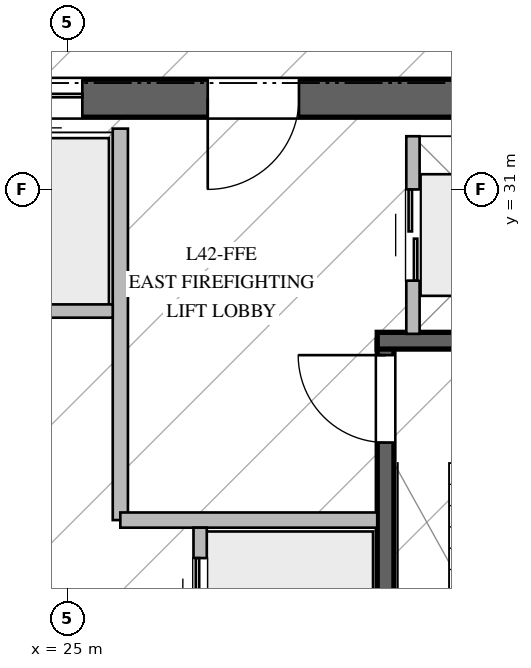
"""IFC4 building model, lengths in metres.
Left out: names, types, materials, properties, quantities, classifications, styles, units other than length and angle.
Written with IfcOpenShell. Run it as: python <this file> out.ifc"""

import sys

from ifc_helpers import new_model, si_unit, direction, frame, frame_2d, origin, place, context, subcontext, project, spatial, rectangle, extrude, element, fill, save


model = new_model("IFC4")
c1 = context("Model", 3, precision=1e-05, world=origin(), true_north=direction((0.0, 1.0)))
c2 = subcontext(c1, "Body", "Model", "MODEL_VIEW")
j1 = project(units=[si_unit("LENGTHUNIT", "METRE"), si_unit("PLANEANGLEUNIT", "RADIAN")], contexts=[c1])
p1 = place(None, origin())
s1 = spatial("IfcSite", under=j1, at=p1, CompositionType="ELEMENT")
p2 = place(p1, origin())
s2 = spatial("IfcBuilding", under=s1, at=p2, CompositionType="ELEMENT")
p3 = place(p2, frame((0.0, 0.0, 175.8)))
s3 = spatial("IfcBuildingStorey", under=s2, at=p3, CompositionType="ELEMENT", Elevation=175.8)
p4 = place(p3, frame((33.05, 32.2, 0.0), z_axis=(0.0, 0.0, 1.0), x_axis=(-1.0, 0.0, 0.0)))
e1 = element("IfcWall", 1, at=p4, inside=s3, PredefinedType="SHEAR", context=c2, shape_type="SweptSolid", body=[
    extrude(rectangle(XDim=16.1, YDim=0.5, at=frame_2d((8.05, 0.0))), origin(), (0.0, 0.0, 1.0), 4.78),
])
p5 = place(p4, frame((5.0, 0.0, 0.0)))
e2 = element("IfcOpeningElement", 2, at=p5, cuts=e1, PredefinedType="OPENING", context=c2, shape_type="SweptSolid", body=[
    extrude(rectangle(XDim=1.2, YDim=2.25, at=frame_2d((0.6, 1.125))), frame((0.0, 0.26, 0.0), z_axis=(0.0, -1.0, 0.0), x_axis=(1.0, 0.0, 0.0)), (0.0, 0.0, 1.0), 0.52),
])
p6 = place(p4, frame((11.8, 0.0, 0.0)))
e3 = element("IfcOpeningElement", 3, at=p6, cuts=e1, PredefinedType="OPENING", context=c2, shape_type="SweptSolid", body=[
    extrude(rectangle(XDim=1.1, YDim=2.2, at=frame_2d((0.55, 1.1))), frame((0.0, 0.26, 0.0), z_axis=(0.0, -1.0, 0.0), x_axis=(1.0, 0.0, 0.0)), (0.0, 0.0, 1.0), 0.52),
])
p7 = place(p4, frame((9.825, 0.0, 0.0)))
e4 = element("IfcOpeningElement", 4, at=p7, cuts=e1, PredefinedType="OPENING", context=c2, shape_type="SweptSolid", body=[
    extrude(rectangle(XDim=1.1, YDim=2.2, at=frame_2d((0.55, 1.1))), frame((0.0, 0.26, 0.0), z_axis=(0.0, -1.0, 0.0), x_axis=(1.0, 0.0, 0.0)), (0.0, 0.0, 1.0), 0.52),
])
p8 = place(p4, frame((7.85, 0.0, 0.0)))
e5 = element("IfcOpeningElement", 5, at=p8, cuts=e1, PredefinedType="OPENING", context=c2, shape_type="SweptSolid", body=[
    extrude(rectangle(XDim=1.1, YDim=2.2, at=frame_2d((0.55, 1.1))), frame((0.0, 0.26, 0.0), z_axis=(0.0, -1.0, 0.0), x_axis=(1.0, 0.0, 0.0)), (0.0, 0.0, 1.0), 0.52),
])
p9 = place(p3, frame((29.19, 21.79, 0.0), z_axis=(0.0, 0.0, 1.0), x_axis=(0.0, 1.0, 0.0)))
e6 = element("IfcWall", 6, at=p9, inside=s3, PredefinedType="SOLIDWALL", context=c2, shape_type="SweptSolid", body=[
    extrude(rectangle(XDim=7.22, YDim=0.22, at=frame_2d((3.61, 0.0))), origin(), (0.0, 0.0, 1.0), 4.78),
])
p10 = place(p9, frame((5.88, 0.0, 0.0)))
e7 = element("IfcOpeningElement", 7, at=p10, cuts=e6, PredefinedType="OPENING", context=c2, shape_type="SweptSolid", body=[
    extrude(rectangle(XDim=1.15, YDim=2.2, at=frame_2d((0.575, 1.1))), frame((0.0, 0.12, 0.0), z_axis=(0.0, -1.0, 0.0), x_axis=(1.0, 0.0, 0.0)), (0.0, 0.0, 1.0), 0.24),
])
p11 = place(p3, frame((29.08, 29.01, 0.0), z_axis=(0.0, 0.0, 1.0), x_axis=(1.0, 0.0, 0.0)))
e8 = element("IfcWall", 8, at=p11, inside=s3, PredefinedType="SOLIDWALL", context=c2, shape_type="SweptSolid", body=[
    extrude(rectangle(XDim=3.72, YDim=0.22, at=frame_2d((1.86, 0.0))), origin(), (0.0, 0.0, 1.0), 4.78),
])
p12 = place(p3, frame((25.7, 26.65, 0.0), z_axis=(0.0, 0.0, 1.0), x_axis=(0.0, 1.0, 0.0)))
e9 = element("IfcWall", 9, at=p12, inside=s3, PredefinedType="PARTITIONING", context=c2, shape_type="SweptSolid", body=[
    extrude(rectangle(XDim=5.15, YDim=0.2, at=frame_2d((2.575, 0.0))), origin(), (0.0, 0.0, 1.0), 4.78),
])
p13 = place(p3, frame((25.7, 26.65, 0.0), z_axis=(0.0, 0.0, 1.0), x_axis=(1.0, 0.0, 0.0)))
e10 = element("IfcWall", 10, at=p13, inside=s3, PredefinedType="PARTITIONING", context=c2, shape_type="SweptSolid", body=[
    extrude(rectangle(XDim=3.38, YDim=0.2, at=frame_2d((1.69, 0.0))), origin(), (0.0, 0.0, 1.0), 4.78),
])
p14 = place(p3, frame((23.7, 29.4, 0.0), z_axis=(0.0, 0.0, 1.0), x_axis=(1.0, 0.0, 0.0)))
e11 = element("IfcWall", 11, at=p14, inside=s3, PredefinedType="PARTITIONING", context=c2, shape_type="SweptSolid", body=[
    extrude(rectangle(XDim=1.9, YDim=0.175, at=frame_2d((0.95, 0.0))), origin(), (0.0, 0.0, 1.0), 4.78),
])
p15 = place(p3, frame((26.75, 24.65, 0.0), z_axis=(0.0, 0.0, 1.0), x_axis=(0.0, 1.0, 0.0)))
e12 = element("IfcWall", 12, at=p15, inside=s3, PredefinedType="PARTITIONING", context=c2, shape_type="SweptSolid", body=[
    extrude(rectangle(XDim=1.9, YDim=0.175, at=frame_2d((0.95, 0.0))), origin(), (0.0, 0.0, 1.0), 4.78),
])
p16 = place(p15, frame((0.4, 0.0, 0.0)))
e13 = element("IfcOpeningElement", 13, at=p16, cuts=e12, PredefinedType="OPENING", context=c2, shape_type="SweptSolid", body=[
    extrude(rectangle(XDim=1.1, YDim=2.2, at=frame_2d((0.55, 1.1))), frame((0.0, 0.098, 0.0), z_axis=(0.0, -1.0, 0.0), x_axis=(1.0, 0.0, 0.0)), (0.0, 0.0, 1.0), 0.195),
])
p17 = place(p3, frame((29.55, 29.1, 0.0), z_axis=(0.0, 0.0, 1.0), x_axis=(0.0, 1.0, 0.0)))
e14 = element("IfcWall", 14, at=p17, inside=s3, PredefinedType="PARTITIONING", context=c2, shape_type="SweptSolid", body=[
    extrude(rectangle(XDim=2.6, YDim=0.175, at=frame_2d((1.3, 0.0))), origin(), (0.0, 0.0, 1.0), 4.78),
])
p18 = place(p17, frame((0.7, 0.0, 0.0)))
e15 = element("IfcOpeningElement", 15, at=p18, cuts=e14, PredefinedType="OPENING", context=c2, shape_type="SweptSolid", body=[
    extrude(rectangle(XDim=1.2, YDim=2.2, at=frame_2d((0.6, 1.1))), frame((0.0, 0.098, 0.0), z_axis=(0.0, -1.0, 0.0), x_axis=(1.0, 0.0, 0.0)), (0.0, 0.0, 1.0), 0.195),
])
p19 = place(p10, origin())
e16 = element("IfcDoor", 16, at=p19, inside=s3, OperationType="SINGLE_SWING_RIGHT", PredefinedType="DOOR", context=c2, shape_type="SweptSolid", body=[
    extrude(rectangle(XDim=1.15, YDim=2.2, at=frame_2d((0.575, 1.1))), frame((0.0, 0.025, 0.0), z_axis=(0.0, -1.0, 0.0), x_axis=(1.0, 0.0, 0.0)), (0.0, 0.0, 1.0), 0.05),
])
fill(e7, e16)
p20 = place(p5, origin())
e17 = element("IfcDoor", 17, at=p20, inside=s3, OperationType="SINGLE_SWING_RIGHT", PredefinedType="DOOR", context=c2, shape_type="SweptSolid", body=[
    extrude(rectangle(XDim=1.2, YDim=2.25, at=frame_2d((0.6, 1.125))), frame((0.0, 0.025, 0.0), z_axis=(0.0, -1.0, 0.0), x_axis=(1.0, 0.0, 0.0)), (0.0, 0.0, 1.0), 0.05),
])
fill(e2, e17)
p21 = place(p8, origin())
e18 = element("IfcDoor", 18, at=p21, inside=s3, OperationType="DOUBLE_DOOR_SLIDING", PredefinedType="DOOR", context=c2, shape_type="SweptSolid", body=[
    extrude(rectangle(XDim=1.1, YDim=2.2, at=frame_2d((0.55, 1.1))), frame((0.0, 0.025, 0.0), z_axis=(0.0, -1.0, 0.0), x_axis=(1.0, 0.0, 0.0)), (0.0, 0.0, 1.0), 0.05),
])
fill(e5, e18)
p22 = place(p16, origin())
e19 = element("IfcDoor", 19, at=p22, inside=s3, OperationType="DOUBLE_DOOR_SLIDING", PredefinedType="DOOR", context=c2, shape_type="SweptSolid", body=[
    extrude(rectangle(XDim=1.1, YDim=2.2, at=frame_2d((0.55, 1.1))), frame((0.0, 0.025, 0.0), z_axis=(0.0, -1.0, 0.0), x_axis=(1.0, 0.0, 0.0)), (0.0, 0.0, 1.0), 0.05),
])
fill(e13, e19)
p23 = place(p18, origin())
e20 = element("IfcDoor", 20, at=p23, inside=s3, OperationType="DOUBLE_DOOR_SLIDING", PredefinedType="DOOR", context=c2, shape_type="SweptSolid", body=[
    extrude(rectangle(XDim=1.2, YDim=2.2, at=frame_2d((0.6, 1.1))), frame((0.0, 0.025, 0.0), z_axis=(0.0, -1.0, 0.0), x_axis=(1.0, 0.0, 0.0)), (0.0, 0.0, 1.0), 0.05),
])
fill(e15, e20)
save(model, sys.argv[1])
